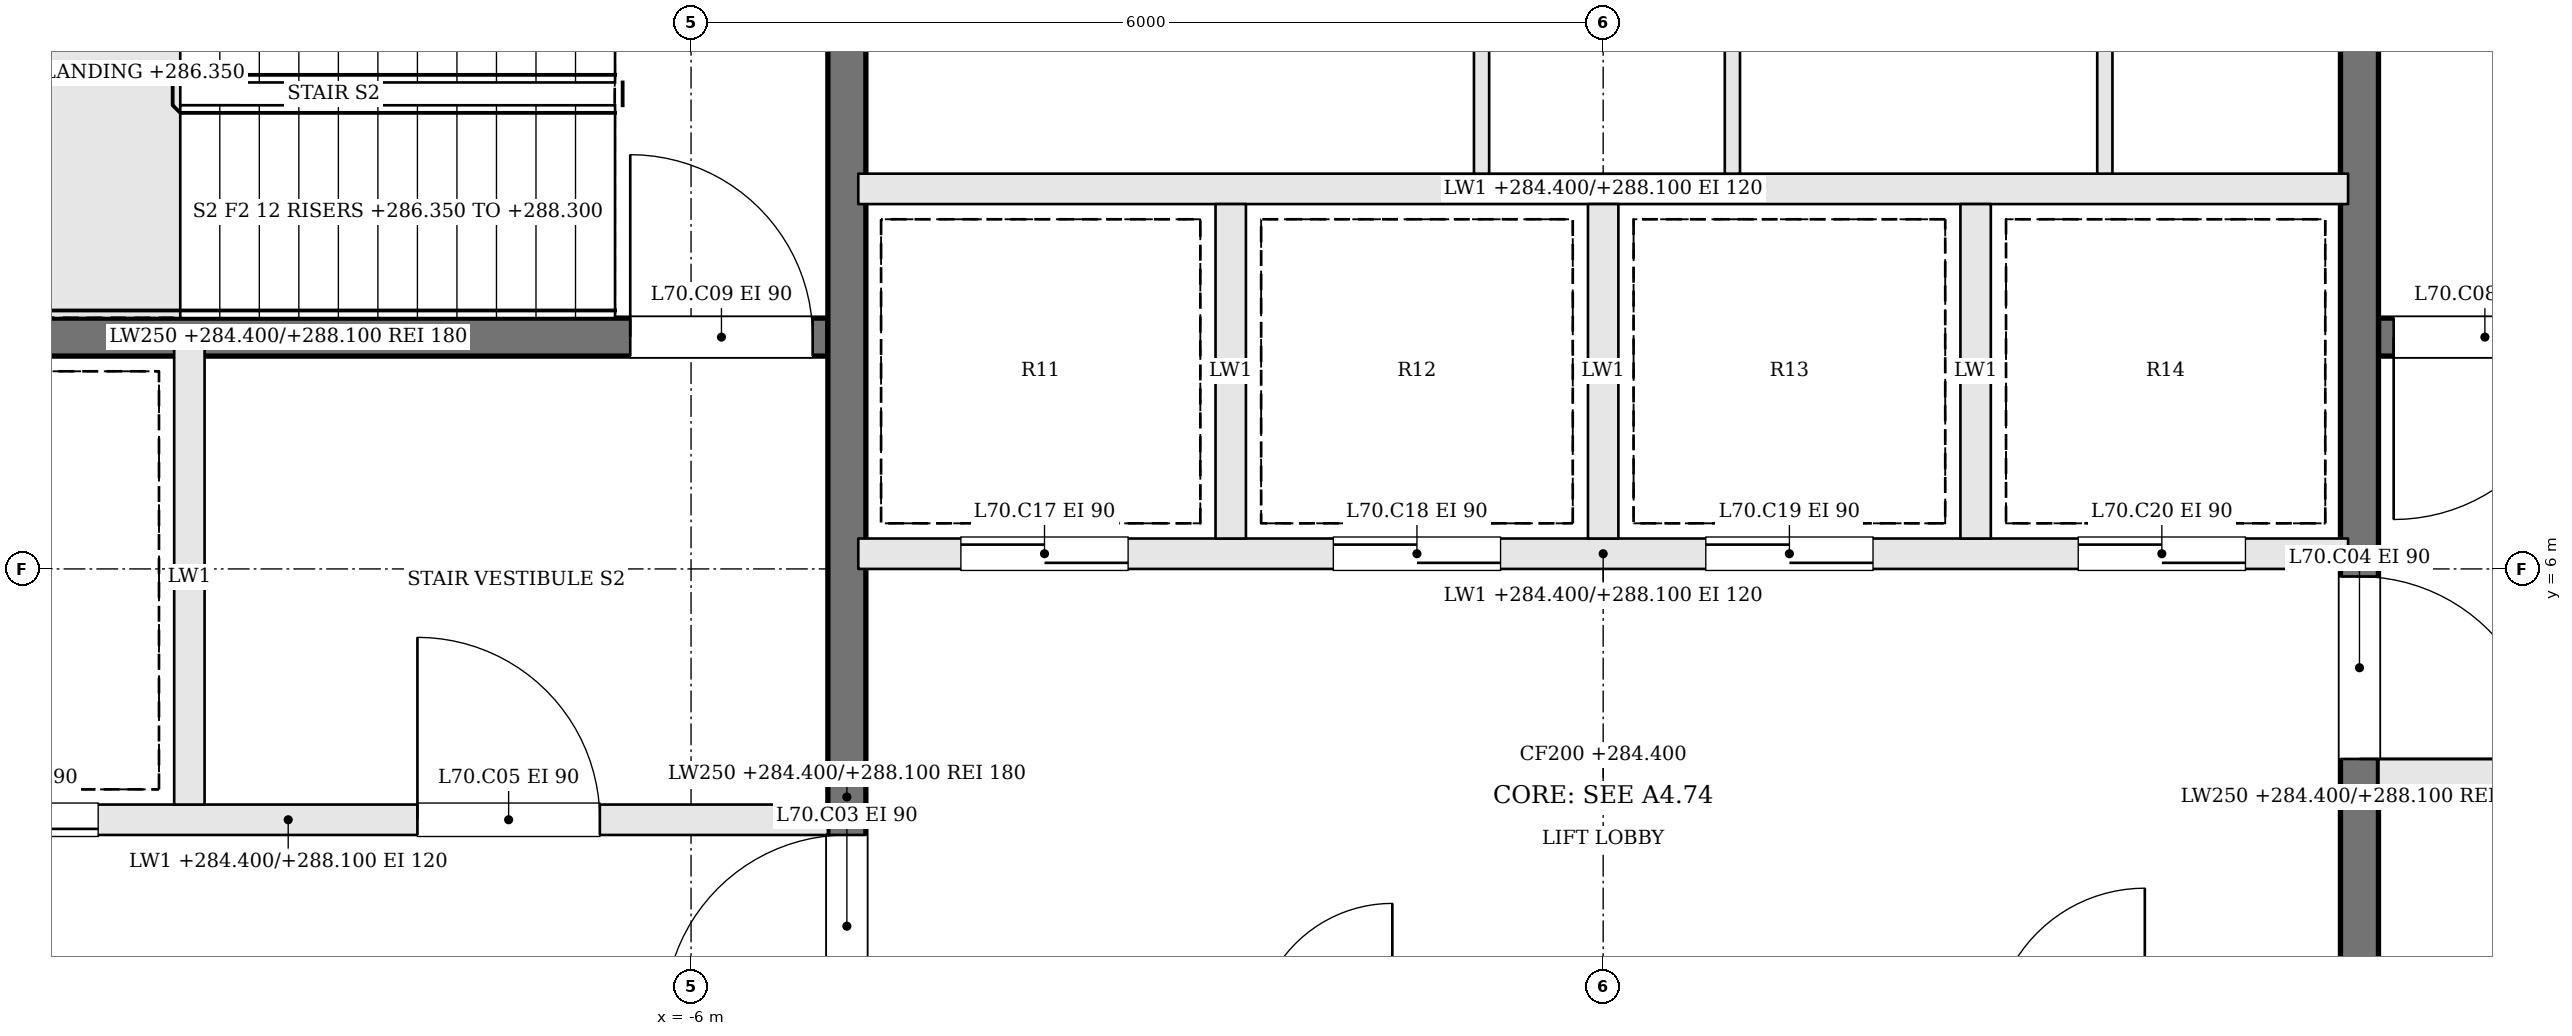
"""IFC4 building model, lengths in metres.
Left out: names, types, materials, properties, quantities, classifications, styles, units other than length and angle.
Written with IfcOpenShell. Run it as: python <this file> out.ifc"""

import sys

from ifc_helpers import new_model, si_unit, direction, frame, frame_2d, origin, place, context, subcontext, project, spatial, rectangle, extrude, element, fill, save


model = new_model("IFC4")
c1 = context("Model", 3, precision=1e-05, world=origin(), true_north=direction((0.0, 1.0)))
c2 = subcontext(c1, "Body", "Model", "MODEL_VIEW")
j1 = project(units=[si_unit("LENGTHUNIT", "METRE"), si_unit("PLANEANGLEUNIT", "RADIAN")], contexts=[c1])
p1 = place(None, origin())
s1 = spatial("IfcSite", under=j1, at=p1, CompositionType="ELEMENT")
p2 = place(p1, origin())
s2 = spatial("IfcBuilding", under=s1, at=p2, CompositionType="ELEMENT")
p3 = place(p2, frame((0.0, 0.0, 284.4)))
s3 = spatial("IfcBuildingStorey", under=s2, at=p3, CompositionType="ELEMENT", Elevation=284.4)
p4 = place(p3, frame((12.2, 7.525, 0.0), z_axis=(0.0, 0.0, 1.0), x_axis=(-1.0, 0.0, 0.0)))
e1 = element("IfcWall", 1, at=p4, inside=s3, PredefinedType="SOLIDWALL", context=c2, shape_type="SweptSolid", body=[
    extrude(rectangle(XDim=7.1, YDim=0.25, at=frame_2d((3.55, 0.0))), origin(), (0.0, 0.0, 1.0), 3.7),
])
p5 = place(p4, frame((5.8, 0.0, 0.0)))
e2 = element("IfcOpeningElement", 2, at=p5, cuts=e1, PredefinedType="OPENING", context=c2, shape_type="SweptSolid", body=[
    extrude(rectangle(XDim=1.2, YDim=2.1, at=frame_2d((0.6, 1.05))), frame((0.0, 0.135, 0.0), z_axis=(0.0, -1.0, 0.0), x_axis=(1.0, 0.0, 0.0)), (0.0, 0.0, 1.0), 0.27),
])
p6 = place(p3, frame((-12.2, 4.35, 0.0), z_axis=(0.0, 0.0, 1.0), x_axis=(1.0, 0.0, 0.0)))
e3 = element("IfcWall", 3, at=p6, inside=s3, PredefinedType="SOLIDWALL", context=c2, shape_type="SweptSolid", body=[
    extrude(rectangle(XDim=7.1, YDim=0.2, at=frame_2d((3.55, 0.0))), origin(), (0.0, 0.0, 1.0), 3.7),
])
p7 = place(p6, frame((4.4, 0.0, 0.0)))
e4 = element("IfcOpeningElement", 4, at=p7, cuts=e3, PredefinedType="OPENING", context=c2, shape_type="SweptSolid", body=[
    extrude(rectangle(XDim=1.2, YDim=2.1, at=frame_2d((0.6, 1.05))), frame((0.0, 0.11, 0.0), z_axis=(0.0, -1.0, 0.0), x_axis=(1.0, 0.0, 0.0)), (0.0, 0.0, 1.0), 0.22),
])
p8 = place(p6, frame((1.1, 0.0, 0.0)))
e5 = element("IfcOpeningElement", 5, at=p8, cuts=e3, PredefinedType="OPENING", context=c2, shape_type="SweptSolid", body=[
    extrude(rectangle(XDim=1.2, YDim=2.1, at=frame_2d((0.6, 1.05))), frame((0.0, 0.11, 0.0), z_axis=(0.0, -1.0, 0.0), x_axis=(1.0, 0.0, 0.0)), (0.0, 0.0, 1.0), 0.22),
])
p9 = place(p3, frame((12.2, 4.65, 0.0), z_axis=(0.0, 0.0, 1.0), x_axis=(-1.0, 0.0, 0.0)))
e6 = element("IfcWall", 6, at=p9, inside=s3, PredefinedType="SOLIDWALL", context=c2, shape_type="SweptSolid", body=[
    extrude(rectangle(XDim=7.1, YDim=0.2, at=frame_2d((3.55, 0.0))), origin(), (0.0, 0.0, 1.0), 3.7),
])
p10 = place(p9, frame((4.4, 0.0, 0.0)))
e7 = element("IfcOpeningElement", 7, at=p10, cuts=e6, PredefinedType="OPENING", context=c2, shape_type="SweptSolid", body=[
    extrude(rectangle(XDim=1.2, YDim=2.1, at=frame_2d((0.6, 1.05))), frame((0.0, 0.11, 0.0), z_axis=(0.0, -1.0, 0.0), x_axis=(1.0, 0.0, 0.0)), (0.0, 0.0, 1.0), 0.22),
])
p11 = place(p9, frame((1.1, 0.0, 0.0)))
e8 = element("IfcOpeningElement", 8, at=p11, cuts=e6, PredefinedType="OPENING", context=c2, shape_type="SweptSolid", body=[
    extrude(rectangle(XDim=1.2, YDim=2.1, at=frame_2d((0.6, 1.05))), frame((0.0, 0.11, 0.0), z_axis=(0.0, -1.0, 0.0), x_axis=(1.0, 0.0, 0.0)), (0.0, 0.0, 1.0), 0.22),
])
p12 = place(p3, frame((-12.2, 7.525, 0.0), z_axis=(0.0, 0.0, 1.0), x_axis=(1.0, 0.0, 0.0)))
e9 = element("IfcWall", 9, at=p12, inside=s3, PredefinedType="SOLIDWALL", context=c2, shape_type="SweptSolid", body=[
    extrude(rectangle(XDim=7.1, YDim=0.25, at=frame_2d((3.55, 0.0))), origin(), (0.0, 0.0, 1.0), 3.7),
])
p13 = place(p12, frame((5.8, 0.0, 0.0)))
e10 = element("IfcOpeningElement", 10, at=p13, cuts=e9, PredefinedType="OPENING", context=c2, shape_type="SweptSolid", body=[
    extrude(rectangle(XDim=1.2, YDim=2.1, at=frame_2d((0.6, 1.05))), frame((0.0, 0.135, 0.0), z_axis=(0.0, -1.0, 0.0), x_axis=(1.0, 0.0, 0.0)), (0.0, 0.0, 1.0), 0.27),
])
p14 = place(p3, frame((-9.3, 4.45, 0.0), z_axis=(0.0, 0.0, 1.0), x_axis=(0.0, 1.0, 0.0)))
e11 = element("IfcWall", 11, at=p14, inside=s3, PredefinedType="SOLIDWALL", context=c2, shape_type="SweptSolid", body=[
    extrude(rectangle(XDim=3.0, YDim=0.2, at=frame_2d((1.5, 0.0))), origin(), (0.0, 0.0, 1.0), 3.7),
])
p15 = place(p3, frame((-4.975, -2.2, 0.0), z_axis=(0.0, 0.0, 1.0), x_axis=(0.0, 1.0, 0.0)))
e12 = element("IfcWall", 12, at=p15, inside=s3, PredefinedType="SOLIDWALL", context=c2, shape_type="SweptSolid", body=[
    extrude(rectangle(XDim=13.4, YDim=0.25, at=frame_2d((6.7, 0.0))), origin(), (0.0, 0.0, 1.0), 3.7),
])
p16 = place(p15, frame((5.25, 0.0, 0.0)))
e13 = element("IfcOpeningElement", 13, at=p16, cuts=e12, PredefinedType="OPENING", context=c2, shape_type="SweptSolid", body=[
    extrude(rectangle(XDim=1.2, YDim=2.1, at=frame_2d((0.6, 1.05))), frame((0.0, 0.135, 0.0), z_axis=(0.0, -1.0, 0.0), x_axis=(1.0, 0.0, 0.0)), (0.0, 0.0, 1.0), 0.27),
])
p17 = place(p3, frame((4.975, 11.2, 0.0), z_axis=(0.0, 0.0, 1.0), x_axis=(0.0, -1.0, 0.0)))
e14 = element("IfcWall", 14, at=p17, inside=s3, PredefinedType="SOLIDWALL", context=c2, shape_type="SweptSolid", body=[
    extrude(rectangle(XDim=13.4, YDim=0.25, at=frame_2d((6.7, 0.0))), origin(), (0.0, 0.0, 1.0), 3.7),
])
p18 = place(p17, frame((5.25, 0.0, 0.0)))
e15 = element("IfcOpeningElement", 15, at=p18, cuts=e14, PredefinedType="OPENING", context=c2, shape_type="SweptSolid", body=[
    extrude(rectangle(XDim=1.2, YDim=2.1, at=frame_2d((0.6, 1.05))), frame((0.0, 0.135, 0.0), z_axis=(0.0, -1.0, 0.0), x_axis=(1.0, 0.0, 0.0)), (0.0, 0.0, 1.0), 0.27),
])
p19 = place(p3, frame((-4.9, 6.1, 0.0), z_axis=(0.0, 0.0, 1.0), x_axis=(1.0, 0.0, 0.0)))
e16 = element("IfcWall", 16, at=p19, inside=s3, PredefinedType="SOLIDWALL", context=c2, shape_type="SweptSolid", body=[
    extrude(rectangle(XDim=9.8, YDim=0.2, at=frame_2d((4.9, 0.0))), origin(), (0.0, 0.0, 1.0), 3.7),
])
p20 = place(p19, frame((0.675, 0.0, 0.0)))
e17 = element("IfcOpeningElement", 17, at=p20, cuts=e16, PredefinedType="OPENING", context=c2, shape_type="SweptSolid", body=[
    extrude(rectangle(XDim=1.1, YDim=2.1, at=frame_2d((0.55, 1.05))), frame((0.0, 0.11, 0.0), z_axis=(0.0, -1.0, 0.0), x_axis=(1.0, 0.0, 0.0)), (0.0, 0.0, 1.0), 0.22),
])
p21 = place(p19, frame((3.125, 0.0, 0.0)))
e18 = element("IfcOpeningElement", 18, at=p21, cuts=e16, PredefinedType="OPENING", context=c2, shape_type="SweptSolid", body=[
    extrude(rectangle(XDim=1.1, YDim=2.1, at=frame_2d((0.55, 1.05))), frame((0.0, 0.11, 0.0), z_axis=(0.0, -1.0, 0.0), x_axis=(1.0, 0.0, 0.0)), (0.0, 0.0, 1.0), 0.22),
])
p22 = place(p19, frame((5.575, 0.0, 0.0)))
e19 = element("IfcOpeningElement", 19, at=p22, cuts=e16, PredefinedType="OPENING", context=c2, shape_type="SweptSolid", body=[
    extrude(rectangle(XDim=1.1, YDim=2.1, at=frame_2d((0.55, 1.05))), frame((0.0, 0.11, 0.0), z_axis=(0.0, -1.0, 0.0), x_axis=(1.0, 0.0, 0.0)), (0.0, 0.0, 1.0), 0.22),
])
p23 = place(p19, frame((8.025, 0.0, 0.0)))
e20 = element("IfcOpeningElement", 20, at=p23, cuts=e16, PredefinedType="OPENING", context=c2, shape_type="SweptSolid", body=[
    extrude(rectangle(XDim=1.1, YDim=2.1, at=frame_2d((0.55, 1.05))), frame((0.0, 0.11, 0.0), z_axis=(0.0, -1.0, 0.0), x_axis=(1.0, 0.0, 0.0)), (0.0, 0.0, 1.0), 0.22),
])
p24 = place(p3, frame((-4.9, 8.5, 0.0), z_axis=(0.0, 0.0, 1.0), x_axis=(1.0, 0.0, 0.0)))
e21 = element("IfcWall", 21, at=p24, inside=s3, PredefinedType="SOLIDWALL", context=c2, shape_type="SweptSolid", body=[
    extrude(rectangle(XDim=9.8, YDim=0.2, at=frame_2d((4.9, 0.0))), origin(), (0.0, 0.0, 1.0), 3.7),
])
for number, where, z_axis, x_axis in (
    (22, (-2.45, 6.2, 0.0), (0.0, 0.0, 1.0), (0.0, 1.0, 0.0)),
    (23, (0.0, 6.2, 0.0), (0.0, 0.0, 1.0), (0.0, 1.0, 0.0)),
    (24, (2.45, 6.2, 0.0), (0.0, 0.0, 1.0), (0.0, 1.0, 0.0)),
):
    element("IfcWall", number, at=place(p3, frame(where, z_axis=z_axis, x_axis=x_axis)), inside=s3, PredefinedType="SOLIDWALL", context=c2, shape_type="SweptSolid", body=[
        extrude(rectangle(XDim=2.2, YDim=0.2, at=frame_2d((1.1, 0.0))), origin(), (0.0, 0.0, 1.0), 3.7),
    ])
for number, where, z_axis, x_axis in (
    (25, (-0.8, 8.6, 0.0), (0.0, 0.0, 1.0), (0.0, 1.0, 0.0)),
    (26, (0.85, 8.6, 0.0), (0.0, 0.0, 1.0), (0.0, 1.0, 0.0)),
    (27, (3.3, 8.6, 0.0), (0.0, 0.0, 1.0), (0.0, 1.0, 0.0)),
):
    element("IfcWall", number, at=place(p3, frame(where, z_axis=z_axis, x_axis=x_axis)), inside=s3, PredefinedType="PARTITIONING", context=c2, shape_type="SweptSolid", body=[
        extrude(rectangle(XDim=2.6, YDim=0.1, at=frame_2d((1.3, 0.0))), origin(), (0.0, 0.0, 1.0), 3.7),
    ])
p25 = place(p16, origin())
e28 = element("IfcDoor", 28, at=p25, inside=s3, OperationType="SINGLE_SWING_LEFT", PredefinedType="DOOR", context=c2, shape_type="SweptSolid", body=[
    extrude(rectangle(XDim=1.2, YDim=2.1, at=frame_2d((0.6, 1.05))), frame((0.0, 0.025, 0.0), z_axis=(0.0, -1.0, 0.0), x_axis=(1.0, 0.0, 0.0)), (0.0, 0.0, 1.0), 0.05),
])
fill(e13, e28)
p26 = place(p18, origin())
e29 = element("IfcDoor", 29, at=p26, inside=s3, OperationType="SINGLE_SWING_RIGHT", PredefinedType="DOOR", context=c2, shape_type="SweptSolid", body=[
    extrude(rectangle(XDim=1.2, YDim=2.1, at=frame_2d((0.6, 1.05))), frame((0.0, 0.025, 0.0), z_axis=(0.0, -1.0, 0.0), x_axis=(1.0, 0.0, 0.0)), (0.0, 0.0, 1.0), 0.05),
])
fill(e15, e29)
p27 = place(p7, origin())
e30 = element("IfcDoor", 30, at=p27, inside=s3, OperationType="SINGLE_SWING_LEFT", PredefinedType="DOOR", context=c2, shape_type="SweptSolid", body=[
    extrude(rectangle(XDim=1.2, YDim=2.1, at=frame_2d((0.6, 1.05))), frame((0.0, 0.025, 0.0), z_axis=(0.0, -1.0, 0.0), x_axis=(1.0, 0.0, 0.0)), (0.0, 0.0, 1.0), 0.05),
])
fill(e4, e30)
p28 = place(p5, origin())
e31 = element("IfcDoor", 31, at=p28, inside=s3, OperationType="SINGLE_SWING_RIGHT", PredefinedType="DOOR", context=c2, shape_type="SweptSolid", body=[
    extrude(rectangle(XDim=1.2, YDim=2.1, at=frame_2d((0.6, 1.05))), frame((0.0, 0.025, 0.0), z_axis=(0.0, -1.0, 0.0), x_axis=(1.0, 0.0, 0.0)), (0.0, 0.0, 1.0), 0.05),
])
fill(e2, e31)
p29 = place(p13, origin())
e32 = element("IfcDoor", 32, at=p29, inside=s3, OperationType="SINGLE_SWING_LEFT", PredefinedType="DOOR", context=c2, shape_type="SweptSolid", body=[
    extrude(rectangle(XDim=1.2, YDim=2.1, at=frame_2d((0.6, 1.05))), frame((0.0, 0.025, 0.0), z_axis=(0.0, -1.0, 0.0), x_axis=(1.0, 0.0, 0.0)), (0.0, 0.0, 1.0), 0.05),
])
fill(e10, e32)
p30 = place(p8, origin())
e33 = element("IfcDoor", 33, at=p30, inside=s3, OperationType="SLIDING_TO_RIGHT", PredefinedType="DOOR", context=c2, shape_type="SweptSolid", body=[
    extrude(rectangle(XDim=1.2, YDim=2.1, at=frame_2d((0.6, 1.05))), frame((0.0, 0.025, 0.0), z_axis=(0.0, -1.0, 0.0), x_axis=(1.0, 0.0, 0.0)), (0.0, 0.0, 1.0), 0.05),
])
fill(e5, e33)
p31 = place(p20, origin())
e34 = element("IfcDoor", 34, at=p31, inside=s3, OperationType="SLIDING_TO_RIGHT", PredefinedType="DOOR", context=c2, shape_type="SweptSolid", body=[
    extrude(rectangle(XDim=1.1, YDim=2.1, at=frame_2d((0.55, 1.05))), frame((0.0, 0.025, 0.0), z_axis=(0.0, -1.0, 0.0), x_axis=(1.0, 0.0, 0.0)), (0.0, 0.0, 1.0), 0.05),
])
fill(e17, e34)
p32 = place(p21, origin())
e35 = element("IfcDoor", 35, at=p32, inside=s3, OperationType="SLIDING_TO_LEFT", PredefinedType="DOOR", context=c2, shape_type="SweptSolid", body=[
    extrude(rectangle(XDim=1.1, YDim=2.1, at=frame_2d((0.55, 1.05))), frame((0.0, 0.025, 0.0), z_axis=(0.0, -1.0, 0.0), x_axis=(1.0, 0.0, 0.0)), (0.0, 0.0, 1.0), 0.05),
])
fill(e18, e35)
p33 = place(p22, origin())
e36 = element("IfcDoor", 36, at=p33, inside=s3, OperationType="SLIDING_TO_RIGHT", PredefinedType="DOOR", context=c2, shape_type="SweptSolid", body=[
    extrude(rectangle(XDim=1.1, YDim=2.1, at=frame_2d((0.55, 1.05))), frame((0.0, 0.025, 0.0), z_axis=(0.0, -1.0, 0.0), x_axis=(1.0, 0.0, 0.0)), (0.0, 0.0, 1.0), 0.05),
])
fill(e19, e36)
p34 = place(p23, origin())
e37 = element("IfcDoor", 37, at=p34, inside=s3, OperationType="SLIDING_TO_LEFT", PredefinedType="DOOR", context=c2, shape_type="SweptSolid", body=[
    extrude(rectangle(XDim=1.1, YDim=2.1, at=frame_2d((0.55, 1.05))), frame((0.0, 0.025, 0.0), z_axis=(0.0, -1.0, 0.0), x_axis=(1.0, 0.0, 0.0)), (0.0, 0.0, 1.0), 0.05),
])
fill(e20, e37)
save(model, sys.argv[1])
